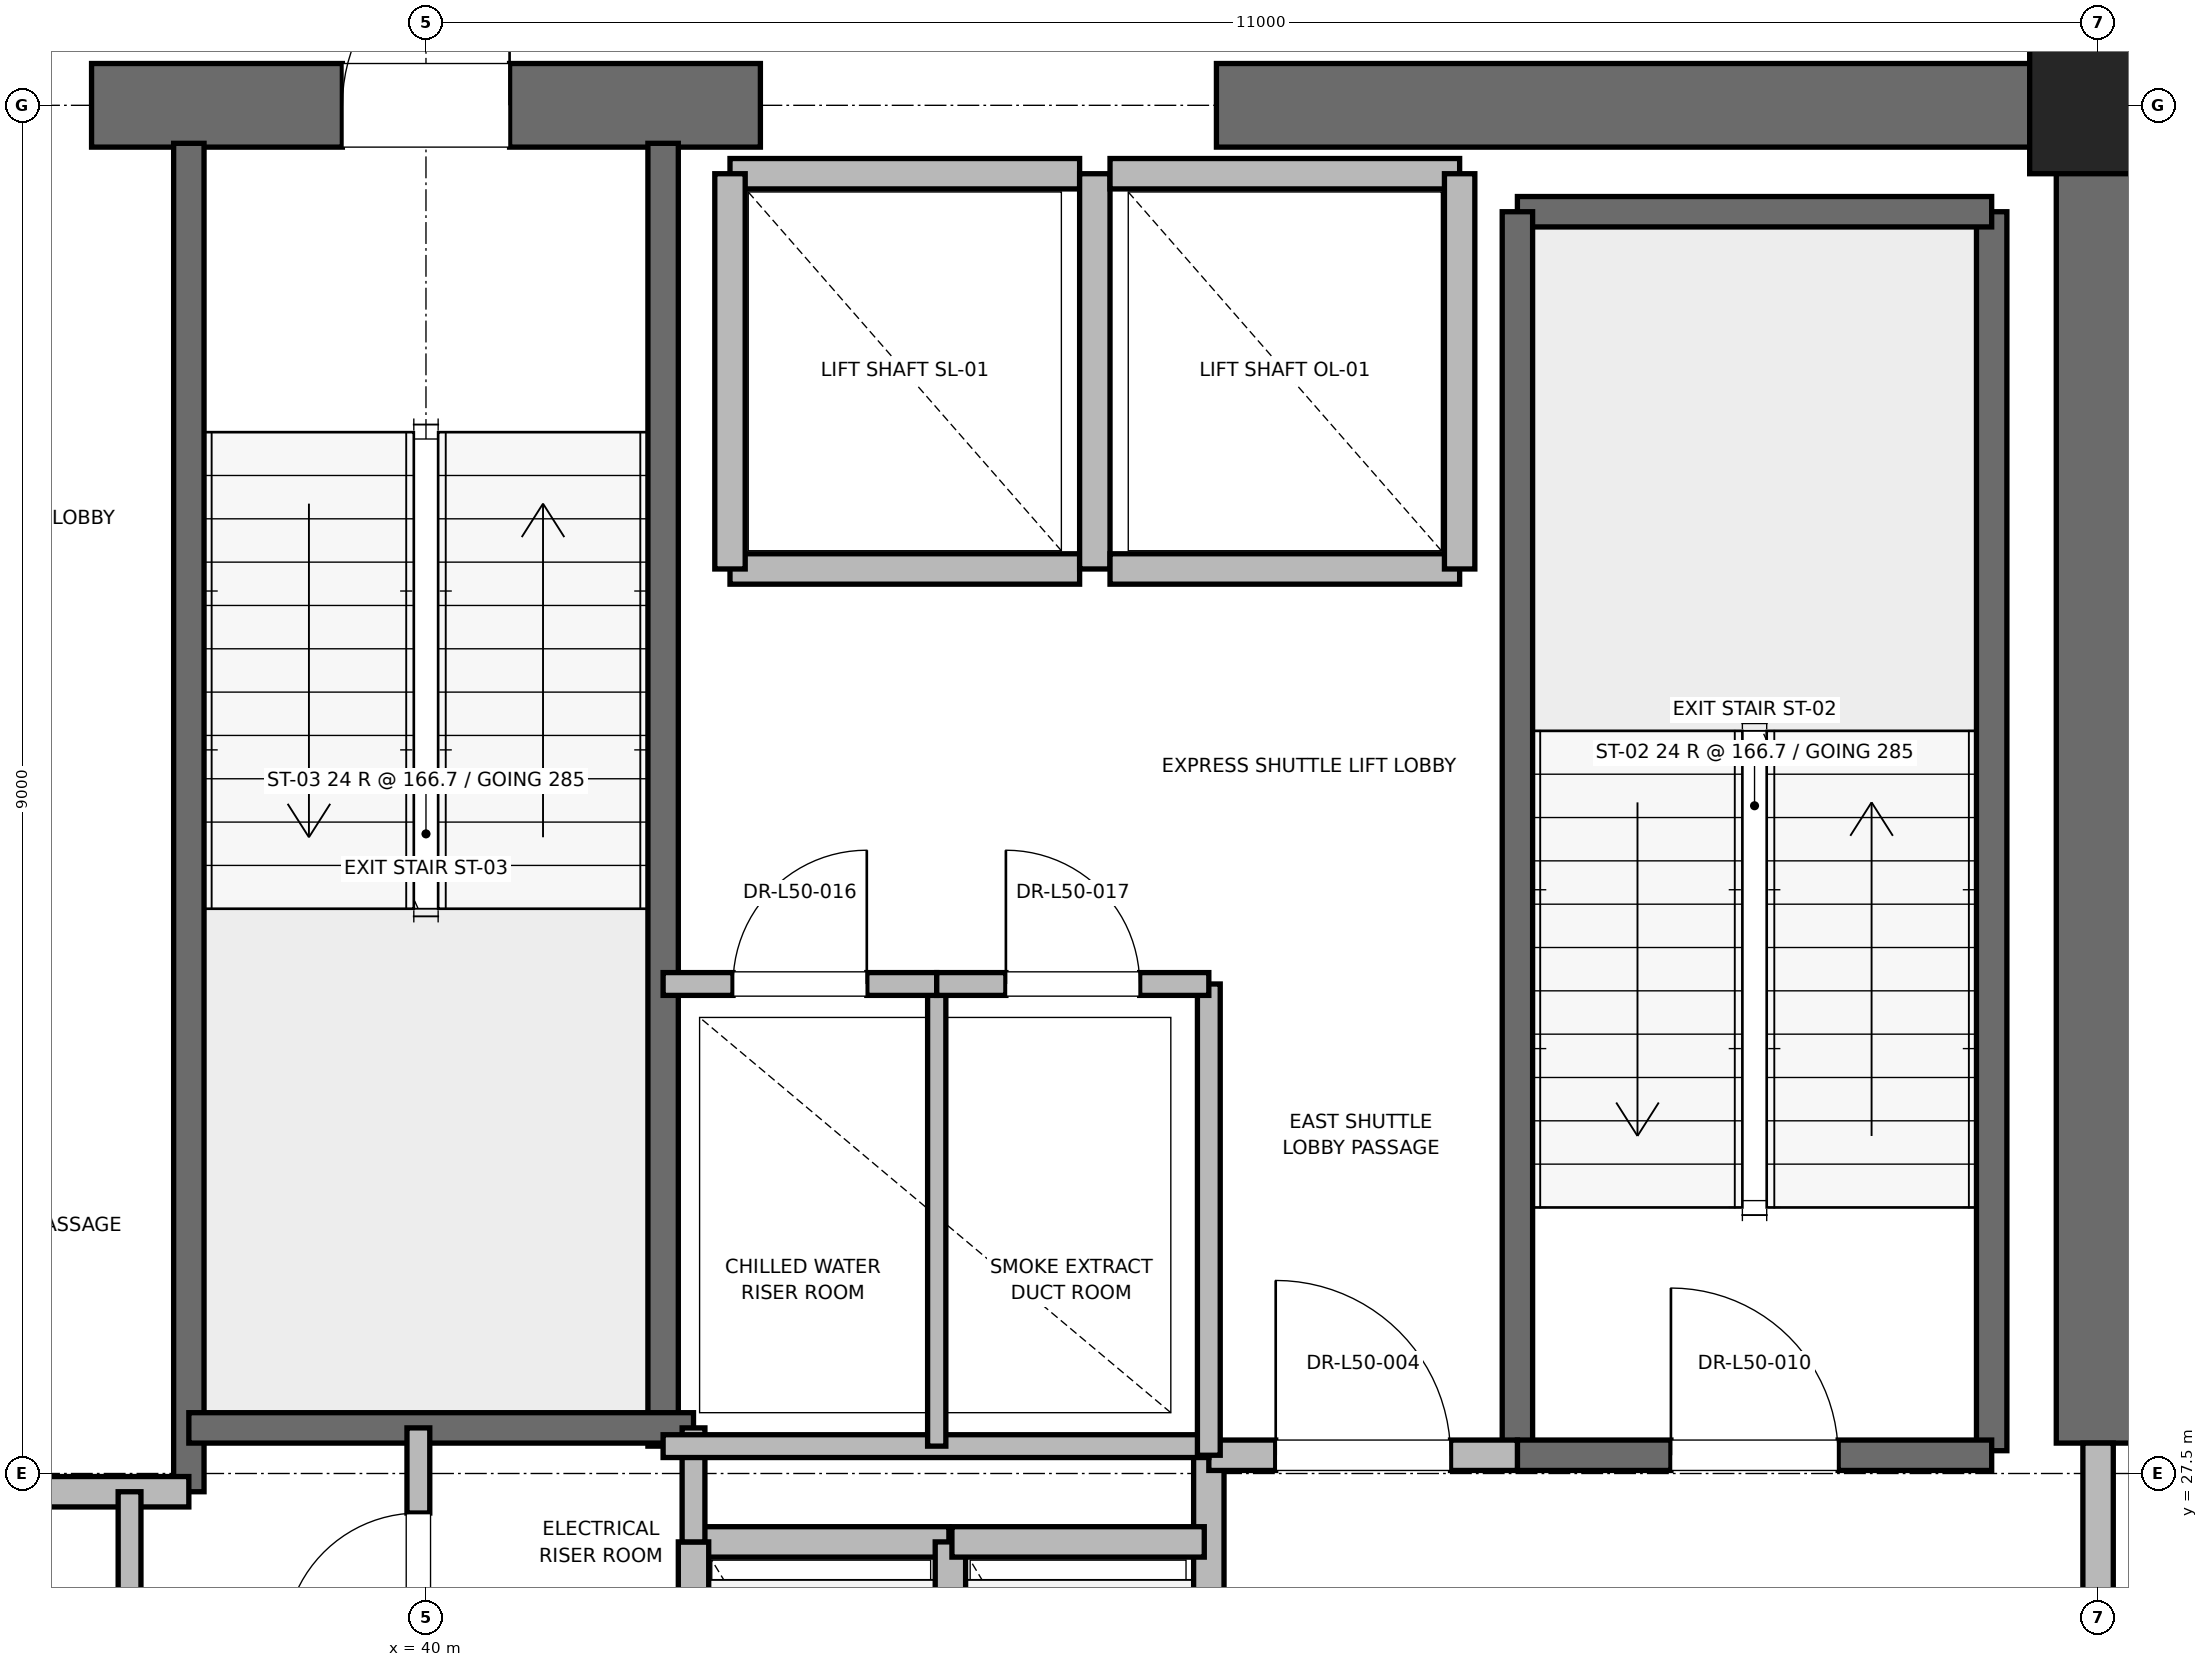
"""IFC4 building model, lengths in metres.
Left out: names, types, materials, properties, quantities, classifications, styles, units other than length and angle.
Written with IfcOpenShell. Run it as: python <this file> out.ifc"""

import sys

from ifc_helpers import new_model, si_unit, direction, frame, frame_2d, origin, origin_2d, place, context, subcontext, project, spatial, rectangle, extrude, element, fill, save


model = new_model("IFC4")
c1 = context("Model", 3, precision=1e-05, world=origin(), true_north=direction((0.0, 1.0)))
c2 = subcontext(c1, "Body", "Model", "MODEL_VIEW")
j1 = project(units=[si_unit("LENGTHUNIT", "METRE"), si_unit("PLANEANGLEUNIT", "RADIAN")], contexts=[c1])
p1 = place(None, origin())
s1 = spatial("IfcSite", under=j1, at=p1, CompositionType="ELEMENT")
p2 = place(p1, origin())
s2 = spatial("IfcBuilding", under=s1, at=p2, CompositionType="ELEMENT")
p3 = place(p2, frame((0.0, 0.0, 217.2)))
s3 = spatial("IfcBuildingStorey", under=s2, at=p3, CompositionType="ELEMENT", Elevation=217.2)
p4 = place(p3, frame((51.0, 36.5, 0.0), z_axis=(0.0, 0.0, 1.0), x_axis=(1.0, 0.0, 0.0)))
e1 = element("IfcColumn", 1, at=p4, inside=s3, PredefinedType="PILASTER", context=c2, shape_type="SweptSolid", body=[
    extrude(rectangle(XDim=0.9, YDim=0.9, at=origin_2d()), origin(), (0.0, 0.0, 1.0), 4.0),
])
p5 = place(p3, frame((37.8, 36.5, 0.0), z_axis=(0.0, 0.0, 1.0), x_axis=(1.0, 0.0, 0.0)))
e2 = element("IfcWall", 2, at=p5, inside=s3, PredefinedType="SHEAR", context=c2, shape_type="SweptSolid", body=[
    extrude(rectangle(XDim=4.4, YDim=0.55, at=frame_2d((2.2, 0.0))), origin(), (0.0, 0.0, 1.0), 3.775),
])
p6 = place(p5, frame((1.65, 0.0, 0.0)))
e3 = element("IfcOpeningElement", 3, at=p6, cuts=e2, PredefinedType="OPENING", context=c2, shape_type="SweptSolid", body=[
    extrude(rectangle(XDim=1.1, YDim=2.15, at=frame_2d((0.55, 1.075))), frame((0.0, 0.275, 0.0), z_axis=(0.0, -1.0, 0.0), x_axis=(1.0, 0.0, 0.0)), (0.0, 0.0, 1.0), 0.55),
])
p7 = place(p3, frame((45.2, 36.5, 0.0), z_axis=(0.0, 0.0, 1.0), x_axis=(1.0, 0.0, 0.0)))
e4 = element("IfcWall", 4, at=p7, inside=s3, PredefinedType="SHEAR", context=c2, shape_type="SweptSolid", body=[
    extrude(rectangle(XDim=5.8, YDim=0.55, at=frame_2d((2.9, 0.0))), origin(), (0.0, 0.0, 1.0), 3.775),
])
p8 = place(p3, frame((51.0, 27.7, 0.0), z_axis=(0.0, 0.0, 1.0), x_axis=(0.0, 1.0, 0.0)))
e5 = element("IfcWall", 5, at=p8, inside=s3, PredefinedType="SHEAR", context=c2, shape_type="SweptSolid", body=[
    extrude(rectangle(XDim=8.8, YDim=0.55, at=frame_2d((4.4, 0.0))), origin(), (0.0, 0.0, 1.0), 3.775),
])
p9 = place(p3, frame((50.3, 27.65, 0.0), z_axis=(0.0, 0.0, 1.0), x_axis=(0.0, 1.0, 0.0)))
e6 = element("IfcWall", 6, at=p9, inside=s3, PredefinedType="SOLIDWALL", context=c2, shape_type="SweptSolid", body=[
    extrude(rectangle(XDim=8.15, YDim=0.2, at=frame_2d((4.075, 0.0))), origin(), (0.0, 0.0, 1.0), 3.775),
])
p10 = place(p3, frame((47.18, 35.8, 0.0), z_axis=(0.0, 0.0, 1.0), x_axis=(1.0, 0.0, 0.0)))
e7 = element("IfcWall", 7, at=p10, inside=s3, PredefinedType="SOLIDWALL", context=c2, shape_type="SweptSolid", body=[
    extrude(rectangle(XDim=3.12, YDim=0.2, at=frame_2d((1.56, 0.0))), origin(), (0.0, 0.0, 1.0), 3.775),
])
p11 = place(p3, frame((47.18, 27.62, 0.0), z_axis=(0.0, 0.0, 1.0), x_axis=(0.0, 1.0, 0.0)))
e8 = element("IfcWall", 8, at=p11, inside=s3, PredefinedType="SOLIDWALL", context=c2, shape_type="SweptSolid", body=[
    extrude(rectangle(XDim=8.18, YDim=0.2, at=frame_2d((4.09, 0.0))), origin(), (0.0, 0.0, 1.0), 3.775),
])
p12 = place(p3, frame((47.18, 27.62, 0.0), z_axis=(0.0, 0.0, 1.0), x_axis=(1.0, 0.0, 0.0)))
e9 = element("IfcWall", 9, at=p12, inside=s3, PredefinedType="SOLIDWALL", context=c2, shape_type="SweptSolid", body=[
    extrude(rectangle(XDim=3.12, YDim=0.2, at=frame_2d((1.56, 0.0))), origin(), (0.0, 0.0, 1.0), 3.775),
])
p13 = place(p12, frame((1.01, 0.0, 0.0)))
e10 = element("IfcOpeningElement", 10, at=p13, cuts=e9, PredefinedType="OPENING", context=c2, shape_type="SweptSolid", body=[
    extrude(rectangle(XDim=1.1, YDim=2.15, at=frame_2d((0.55, 1.075))), frame((0.0, 0.1, 0.0), z_axis=(0.0, -1.0, 0.0), x_axis=(1.0, 0.0, 0.0)), (0.0, 0.0, 1.0), 0.2),
])
p14 = place(p3, frame((38.44, 27.38, 0.0), z_axis=(0.0, 0.0, 1.0), x_axis=(0.0, 1.0, 0.0)))
e11 = element("IfcWall", 11, at=p14, inside=s3, PredefinedType="SOLIDWALL", context=c2, shape_type="SweptSolid", body=[
    extrude(rectangle(XDim=8.87, YDim=0.2, at=frame_2d((4.435, 0.0))), origin(), (0.0, 0.0, 1.0), 3.775),
])
p15 = place(p3, frame((41.56, 27.68, 0.0), z_axis=(0.0, 0.0, 1.0), x_axis=(0.0, 1.0, 0.0)))
e12 = element("IfcWall", 12, at=p15, inside=s3, PredefinedType="SOLIDWALL", context=c2, shape_type="SweptSolid", body=[
    extrude(rectangle(XDim=8.57, YDim=0.2, at=frame_2d((4.285, 0.0))), origin(), (0.0, 0.0, 1.0), 3.775),
])
p16 = place(p3, frame((38.44, 27.8, 0.0), z_axis=(0.0, 0.0, 1.0), x_axis=(1.0, 0.0, 0.0)))
e13 = element("IfcWall", 13, at=p16, inside=s3, PredefinedType="SOLIDWALL", context=c2, shape_type="SweptSolid", body=[
    extrude(rectangle(XDim=3.32, YDim=0.2, at=frame_2d((1.66, 0.0))), origin(), (0.0, 0.0, 1.0), 3.775),
])
p17 = place(p3, frame((32.82, 27.38, 0.0), z_axis=(0.0, 0.0, 1.0), x_axis=(1.0, 0.0, 0.0)))
e14 = element("IfcWall", 14, at=p17, inside=s3, PredefinedType="PARTITIONING", context=c2, shape_type="SweptSolid", body=[
    extrude(rectangle(XDim=5.62, YDim=0.2, at=frame_2d((2.81, 0.0))), origin(), (0.0, 0.0, 1.0), 3.775),
])
p18 = place(p3, frame((45.15, 24.25, 0.0), z_axis=(0.0, 0.0, 1.0), x_axis=(0.0, 1.0, 0.0)))
e15 = element("IfcWall", 15, at=p18, inside=s3, PredefinedType="PARTITIONING", context=c2, shape_type="SweptSolid", body=[
    extrude(rectangle(XDim=3.37, YDim=0.2, at=frame_2d((1.685, 0.0))), origin(), (0.0, 0.0, 1.0), 3.775),
])
p19 = place(p3, frame((45.15, 27.62, 0.0), z_axis=(0.0, 0.0, 1.0), x_axis=(1.0, 0.0, 0.0)))
e16 = element("IfcWall", 16, at=p19, inside=s3, PredefinedType="PARTITIONING", context=c2, shape_type="SweptSolid", body=[
    extrude(rectangle(XDim=2.03, YDim=0.2, at=frame_2d((1.015, 0.0))), origin(), (0.0, 0.0, 1.0), 3.775),
])
p20 = place(p19, frame((0.44, 0.0, 0.0)))
e17 = element("IfcOpeningElement", 17, at=p20, cuts=e16, PredefinedType="OPENING", context=c2, shape_type="SweptSolid", body=[
    extrude(rectangle(XDim=1.15, YDim=2.2, at=frame_2d((0.575, 1.1))), frame((0.0, 0.1, 0.0), z_axis=(0.0, -1.0, 0.0), x_axis=(1.0, 0.0, 0.0)), (0.0, 0.0, 1.0), 0.2),
])
p21 = place(p3, frame((51.0, 24.3, 0.0), z_axis=(0.0, 0.0, 1.0), x_axis=(0.0, 1.0, 0.0)))
e18 = element("IfcWall", 18, at=p21, inside=s3, PredefinedType="PARTITIONING", context=c2, shape_type="SweptSolid", body=[
    extrude(rectangle(XDim=3.4, YDim=0.2, at=frame_2d((1.7, 0.0))), origin(), (0.0, 0.0, 1.0), 2.755),
])
p22 = place(p21, frame((1.125, 0.0, 0.0)))
e19 = element("IfcOpeningElement", 19, at=p22, cuts=e18, PredefinedType="OPENING", context=c2, shape_type="SweptSolid", body=[
    extrude(rectangle(XDim=1.15, YDim=2.2, at=frame_2d((0.575, 1.1))), frame((0.0, 0.1, 0.0), z_axis=(0.0, -1.0, 0.0), x_axis=(1.0, 0.0, 0.0)), (0.0, 0.0, 1.0), 0.2),
])
p23 = place(p3, frame((43.44, 27.05, 0.0), z_axis=(0.0, 0.0, 1.0), x_axis=(-1.0, 0.0, 0.0)))
e20 = element("IfcWall", 20, at=p23, inside=s3, PredefinedType="SOLIDWALL", context=c2, shape_type="SweptSolid", body=[
    extrude(rectangle(XDim=1.68, YDim=0.2, at=frame_2d((0.84, 0.0))), origin(), (0.0, 0.0, 1.0), 3.775),
])
for number, where, z_axis, x_axis in (
    (21, (41.76, 27.05, 0.0), (0.0, 0.0, 1.0), (0.0, -1.0, 0.0)),
    (22, (43.45, 24.45, 0.0), (0.0, 0.0, 1.0), (0.0, 1.0, 0.0)),
):
    element("IfcWall", number, at=place(p3, frame(where, z_axis=z_axis, x_axis=x_axis)), inside=s3, PredefinedType="SOLIDWALL", context=c2, shape_type="SweptSolid", body=[
        extrude(rectangle(XDim=2.6, YDim=0.2, at=frame_2d((1.3, 0.0))), origin(), (0.0, 0.0, 1.0), 3.775),
    ])
p24 = place(p3, frame((45.12, 27.05, 0.0), z_axis=(0.0, 0.0, 1.0), x_axis=(-1.0, 0.0, 0.0)))
e23 = element("IfcWall", 23, at=p24, inside=s3, PredefinedType="SOLIDWALL", context=c2, shape_type="SweptSolid", body=[
    extrude(rectangle(XDim=1.66, YDim=0.2, at=frame_2d((0.83, 0.0))), origin(), (0.0, 0.0, 1.0), 3.775),
])
p25 = place(p3, frame((42.0, 33.45, 0.0), z_axis=(0.0, 0.0, 1.0), x_axis=(1.0, 0.0, 0.0)))
e24 = element("IfcWall", 24, at=p25, inside=s3, PredefinedType="SOLIDWALL", context=c2, shape_type="SweptSolid", body=[
    extrude(rectangle(XDim=2.3, YDim=0.2, at=frame_2d((1.15, 0.0))), origin(), (0.0, 0.0, 1.0), 3.775),
])
p26 = place(p3, frame((44.3, 36.05, 0.0), z_axis=(0.0, 0.0, 1.0), x_axis=(-1.0, 0.0, 0.0)))
e25 = element("IfcWall", 25, at=p26, inside=s3, PredefinedType="SOLIDWALL", context=c2, shape_type="SweptSolid", body=[
    extrude(rectangle(XDim=2.3, YDim=0.2, at=frame_2d((1.15, 0.0))), origin(), (0.0, 0.0, 1.0), 2.755),
])
for number, where, z_axis, x_axis in (
    (26, (42.0, 36.05, 0.0), (0.0, 0.0, 1.0), (0.0, -1.0, 0.0)),
    (27, (44.4, 33.45, 0.0), (0.0, 0.0, 1.0), (0.0, 1.0, 0.0)),
):
    element("IfcWall", number, at=place(p3, frame(where, z_axis=z_axis, x_axis=x_axis)), inside=s3, PredefinedType="SOLIDWALL", context=c2, shape_type="SweptSolid", body=[
        extrude(rectangle(XDim=2.6, YDim=0.2, at=frame_2d((1.3, 0.0))), origin(), (0.0, 0.0, 1.0), 2.755),
    ])
p27 = place(p3, frame((44.5, 33.45, 0.0), z_axis=(0.0, 0.0, 1.0), x_axis=(1.0, 0.0, 0.0)))
e28 = element("IfcWall", 28, at=p27, inside=s3, PredefinedType="SOLIDWALL", context=c2, shape_type="SweptSolid", body=[
    extrude(rectangle(XDim=2.3, YDim=0.2, at=frame_2d((1.15, 0.0))), origin(), (0.0, 0.0, 1.0), 3.775),
])
p28 = place(p3, frame((46.8, 36.05, 0.0), z_axis=(0.0, 0.0, 1.0), x_axis=(-1.0, 0.0, 0.0)))
e29 = element("IfcWall", 29, at=p28, inside=s3, PredefinedType="SOLIDWALL", context=c2, shape_type="SweptSolid", body=[
    extrude(rectangle(XDim=2.3, YDim=0.2, at=frame_2d((1.15, 0.0))), origin(), (0.0, 0.0, 1.0), 2.755),
])
p29 = place(p3, frame((46.8, 33.45, 0.0), z_axis=(0.0, 0.0, 1.0), x_axis=(0.0, 1.0, 0.0)))
e30 = element("IfcWall", 30, at=p29, inside=s3, PredefinedType="SOLIDWALL", context=c2, shape_type="SweptSolid", body=[
    extrude(rectangle(XDim=2.6, YDim=0.2, at=frame_2d((1.3, 0.0))), origin(), (0.0, 0.0, 1.0), 3.775),
])
p30 = place(p3, frame((41.76, 27.05, 0.0), z_axis=(0.0, 0.0, 1.0), x_axis=(0.0, 1.0, 0.0)))
e31 = element("IfcWall", 31, at=p30, inside=s3, PredefinedType="PARTITIONING", context=c2, shape_type="SweptSolid", body=[
    extrude(rectangle(XDim=0.75, YDim=0.15, at=frame_2d((0.375, 0.0))), origin(), (0.0, 0.0, 1.0), 2.85),
])
p31 = place(p3, frame((39.95, 25.8, 0.0), z_axis=(0.0, 0.0, 1.0), x_axis=(0.0, 1.0, 0.0)))
e32 = element("IfcWall", 32, at=p31, inside=s3, PredefinedType="PARTITIONING", context=c2, shape_type="SweptSolid", body=[
    extrude(rectangle(XDim=2.0, YDim=0.15, at=frame_2d((1.0, 0.0))), origin(), (0.0, 0.0, 1.0), 2.85),
])
p32 = place(p31, frame((0.56, 0.0, 0.0)))
e33 = element("IfcOpeningElement", 33, at=p32, cuts=e32, PredefinedType="OPENING", context=c2, shape_type="SweptSolid", body=[
    extrude(rectangle(XDim=0.88, YDim=2.1, at=frame_2d((0.44, 1.05))), frame((0.0, 0.075, 0.0), z_axis=(0.0, -1.0, 0.0), x_axis=(1.0, 0.0, 0.0)), (0.0, 0.0, 1.0), 0.15),
])
p33 = place(p3, frame((38.05, 23.06, 0.0), z_axis=(0.0, 0.0, 1.0), x_axis=(0.0, 1.0, 0.0)))
e34 = element("IfcWall", 34, at=p33, inside=s3, PredefinedType="PARTITIONING", context=c2, shape_type="SweptSolid", body=[
    extrude(rectangle(XDim=4.32, YDim=0.15, at=frame_2d((2.16, 0.0))), origin(), (0.0, 0.0, 1.0), 2.85),
])
p34 = place(p33, frame((1.66, 0.0, 0.0)))
e35 = element("IfcOpeningElement", 35, at=p34, cuts=e34, PredefinedType="OPENING", context=c2, shape_type="SweptSolid", body=[
    extrude(rectangle(XDim=1.0, YDim=2.15, at=frame_2d((0.5, 1.075))), frame((0.0, 0.075, 0.0), z_axis=(0.0, -1.0, 0.0), x_axis=(1.0, 0.0, 0.0)), (0.0, 0.0, 1.0), 0.15),
])
p35 = place(p3, frame((41.56, 27.68, 0.0), z_axis=(0.0, 0.0, 1.0), x_axis=(1.0, 0.0, 0.0)))
e36 = element("IfcWall", 36, at=p35, inside=s3, PredefinedType="PARTITIONING", context=c2, shape_type="SweptSolid", body=[
    extrude(rectangle(XDim=3.59, YDim=0.15, at=frame_2d((1.795, 0.0))), origin(), (0.0, 0.0, 1.0), 2.85),
])
p36 = place(p3, frame((45.15, 27.62, 0.0), z_axis=(0.0, 0.0, 1.0), x_axis=(0.0, 1.0, 0.0)))
e37 = element("IfcWall", 37, at=p36, inside=s3, PredefinedType="PARTITIONING", context=c2, shape_type="SweptSolid", body=[
    extrude(rectangle(XDim=3.1, YDim=0.15, at=frame_2d((1.55, 0.0))), origin(), (0.0, 0.0, 1.0), 2.85),
])
p37 = place(p3, frame((43.36, 27.68, 0.0), z_axis=(0.0, 0.0, 1.0), x_axis=(0.0, 1.0, 0.0)))
e38 = element("IfcWall", 38, at=p37, inside=s3, PredefinedType="PARTITIONING", context=c2, shape_type="SweptSolid", body=[
    extrude(rectangle(XDim=3.04, YDim=0.12, at=frame_2d((1.52, 0.0))), origin(), (0.0, 0.0, 1.0), 2.85),
])
p38 = place(p3, frame((41.56, 30.72, 0.0), z_axis=(0.0, 0.0, 1.0), x_axis=(1.0, 0.0, 0.0)))
e39 = element("IfcWall", 39, at=p38, inside=s3, PredefinedType="PARTITIONING", context=c2, shape_type="SweptSolid", body=[
    extrude(rectangle(XDim=1.8, YDim=0.15, at=frame_2d((0.9, 0.0))), origin(), (0.0, 0.0, 1.0), 2.85),
])
p39 = place(p38, frame((0.46, 0.0, 0.0)))
e40 = element("IfcOpeningElement", 40, at=p39, cuts=e39, PredefinedType="OPENING", context=c2, shape_type="SweptSolid", body=[
    extrude(rectangle(XDim=0.88, YDim=2.1, at=frame_2d((0.44, 1.05))), frame((0.0, 0.075, 0.0), z_axis=(0.0, -1.0, 0.0), x_axis=(1.0, 0.0, 0.0)), (0.0, 0.0, 1.0), 0.15),
])
p40 = place(p3, frame((43.36, 30.72, 0.0), z_axis=(0.0, 0.0, 1.0), x_axis=(1.0, 0.0, 0.0)))
e41 = element("IfcWall", 41, at=p40, inside=s3, PredefinedType="PARTITIONING", context=c2, shape_type="SweptSolid", body=[
    extrude(rectangle(XDim=1.79, YDim=0.15, at=frame_2d((0.895, 0.0))), origin(), (0.0, 0.0, 1.0), 2.85),
])
p41 = place(p40, frame((0.455, 0.0, 0.0)))
e42 = element("IfcOpeningElement", 42, at=p41, cuts=e41, PredefinedType="OPENING", context=c2, shape_type="SweptSolid", body=[
    extrude(rectangle(XDim=0.88, YDim=2.1, at=frame_2d((0.44, 1.05))), frame((0.0, 0.075, 0.0), z_axis=(0.0, -1.0, 0.0), x_axis=(1.0, 0.0, 0.0)), (0.0, 0.0, 1.0), 0.15),
])
p42 = place(p13, origin())
e43 = element("IfcDoor", 43, at=p42, inside=s3, OperationType="SINGLE_SWING_LEFT", PredefinedType="DOOR", context=c2, shape_type="SweptSolid", body=[
    extrude(rectangle(XDim=1.1, YDim=2.15, at=frame_2d((0.55, 1.075))), frame((0.0, 0.025, 0.0), z_axis=(0.0, -1.0, 0.0), x_axis=(1.0, 0.0, 0.0)), (0.0, 0.0, 1.0), 0.05),
])
fill(e10, e43)
p43 = place(p6, origin())
e44 = element("IfcDoor", 44, at=p43, inside=s3, OperationType="SINGLE_SWING_RIGHT", PredefinedType="DOOR", context=c2, shape_type="SweptSolid", body=[
    extrude(rectangle(XDim=1.1, YDim=2.15, at=frame_2d((0.55, 1.075))), frame((0.0, 0.025, 0.0), z_axis=(0.0, -1.0, 0.0), x_axis=(1.0, 0.0, 0.0)), (0.0, 0.0, 1.0), 0.05),
])
fill(e3, e44)
p44 = place(p20, origin())
e45 = element("IfcDoor", 45, at=p44, inside=s3, OperationType="SINGLE_SWING_LEFT", PredefinedType="DOOR", context=c2, shape_type="SweptSolid", body=[
    extrude(rectangle(XDim=1.15, YDim=2.2, at=frame_2d((0.575, 1.1))), frame((0.0, 0.025, 0.0), z_axis=(0.0, -1.0, 0.0), x_axis=(1.0, 0.0, 0.0)), (0.0, 0.0, 1.0), 0.05),
])
fill(e17, e45)
p45 = place(p32, origin())
e46 = element("IfcDoor", 46, at=p45, inside=s3, OperationType="SINGLE_SWING_LEFT", PredefinedType="DOOR", context=c2, shape_type="SweptSolid", body=[
    extrude(rectangle(XDim=0.88, YDim=2.1, at=frame_2d((0.44, 1.05))), frame((0.0, 0.025, 0.0), z_axis=(0.0, -1.0, 0.0), x_axis=(1.0, 0.0, 0.0)), (0.0, 0.0, 1.0), 0.05),
])
fill(e33, e46)
p46 = place(p39, origin())
e47 = element("IfcDoor", 47, at=p46, inside=s3, OperationType="SINGLE_SWING_RIGHT", PredefinedType="DOOR", context=c2, shape_type="SweptSolid", body=[
    extrude(rectangle(XDim=0.88, YDim=2.1, at=frame_2d((0.44, 1.05))), frame((0.0, 0.025, 0.0), z_axis=(0.0, -1.0, 0.0), x_axis=(1.0, 0.0, 0.0)), (0.0, 0.0, 1.0), 0.05),
])
fill(e40, e47)
p47 = place(p41, origin())
e48 = element("IfcDoor", 48, at=p47, inside=s3, OperationType="SINGLE_SWING_LEFT", PredefinedType="DOOR", context=c2, shape_type="SweptSolid", body=[
    extrude(rectangle(XDim=0.88, YDim=2.1, at=frame_2d((0.44, 1.05))), frame((0.0, 0.025, 0.0), z_axis=(0.0, -1.0, 0.0), x_axis=(1.0, 0.0, 0.0)), (0.0, 0.0, 1.0), 0.05),
])
fill(e42, e48)
save(model, sys.argv[1])
